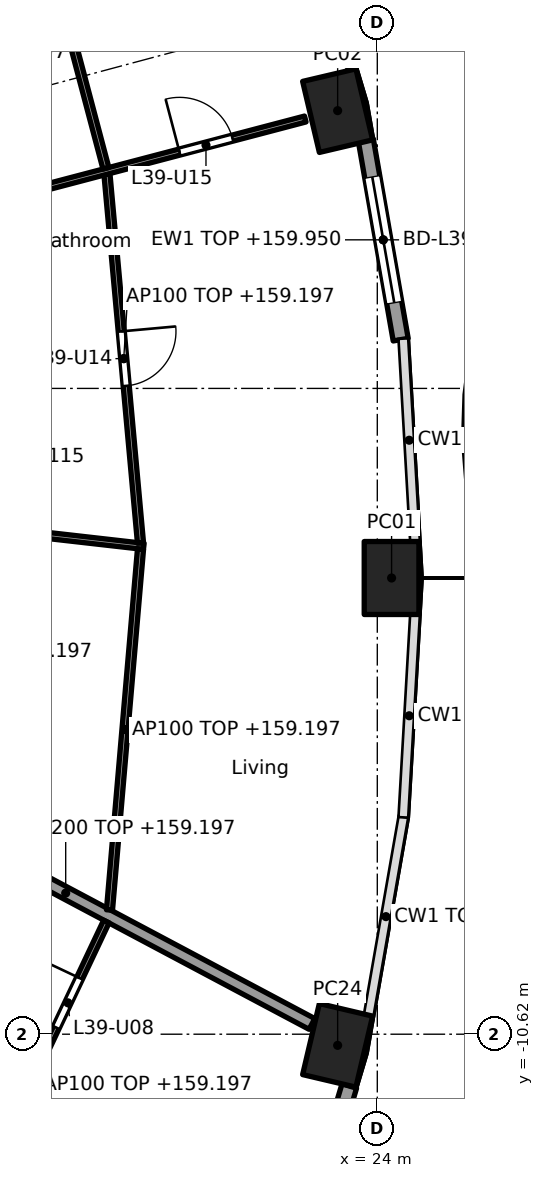
"""IFC4 building model, lengths in metres.
Left out: names, types, materials, properties, quantities, classifications, styles, units other than length and angle.
Written with IfcOpenShell. Run it as: python <this file> out.ifc"""

import sys

from ifc_helpers import new_model, si_unit, direction, frame, frame_2d, origin, origin_2d, place, context, subcontext, project, spatial, rectangle, hollow_rectangle, extrude, element, fill, save


model = new_model("IFC4")
c1 = context("Model", 3, precision=1e-05, world=origin(), true_north=direction((0.0, 1.0)))
c2 = subcontext(c1, "Body", "Model", "MODEL_VIEW")
j1 = project(units=[si_unit("LENGTHUNIT", "METRE"), si_unit("PLANEANGLEUNIT", "RADIAN")], contexts=[c1])
p1 = place(None, origin())
s1 = spatial("IfcSite", under=j1, at=p1, CompositionType="ELEMENT")
p2 = place(p1, origin())
s2 = spatial("IfcBuilding", under=s1, at=p2, CompositionType="ELEMENT")
p3 = place(p2, frame((0.0, 0.0, 156.6)))
s3 = spatial("IfcBuildingStorey", under=s2, at=p3, CompositionType="ELEMENT", Elevation=156.6)
for number, where, z_axis, x_axis in (
    (1, (24.235, -3.118, 0.0), (0.0, 0.0, 1.0), (0.0, 1.0, 0.0)),
    (2, (23.348, 4.568, 0.0), (0.0, 0.0, 1.0), (-0.229, 0.973, 0.0)),
    (3, (23.348, -10.803, 0.0), (0.0, 0.0, 1.0), (0.229, 0.973, 0.0)),
):
    element("IfcColumn", number, at=place(p3, frame(where, z_axis=z_axis, x_axis=x_axis)), inside=s3, PredefinedType="COLUMN", context=c2, shape_type="SweptSolid", body=[
        extrude(hollow_rectangle(XDim=1.2, YDim=0.9, WallThickness=0.04, at=origin_2d()), origin(), (0.0, 0.0, 1.0), 3.7),
    ])
p4 = place(p3, frame((23.811, 4.085, 0.0), z_axis=(0.0, 0.0, 1.0), x_axis=(0.172163521006, -0.985068384446, 0.0)))
e4 = element("IfcWall", 4, at=p4, inside=s3, PredefinedType="SOLIDWALL", context=c2, shape_type="SweptSolid", body=[
    extrude(rectangle(XDim=3.333, YDim=0.25, at=frame_2d((1.666, 0.0))), origin(), (0.0, 0.0, 1.0), 3.35),
])
p5 = place(p4, frame((0.616, 0.0, 0.0)))
e5 = element("IfcOpeningElement", 5, at=p5, cuts=e4, PredefinedType="OPENING", context=c2, shape_type="SweptSolid", body=[
    extrude(rectangle(XDim=2.1, YDim=2.4, at=frame_2d((1.05, 1.2))), frame((0.0, 0.135, 0.0), z_axis=(0.0, -1.0, 0.0), x_axis=(1.0, 0.0, 0.0)), (0.0, 0.0, 1.0), 0.27),
])
p6 = place(p3, frame((23.54, -11.472, 0.0), z_axis=(0.0, 0.0, 1.0), x_axis=(-0.285821792767, -0.958282788523, 0.0)))
e6 = element("IfcWall", 6, at=p6, inside=s3, PredefinedType="SOLIDWALL", context=c2, shape_type="SweptSolid", body=[
    extrude(rectangle(XDim=3.303, YDim=0.25, at=frame_2d((1.651, 0.0))), origin(), (0.0, 0.0, 1.0), 3.35),
])
p7 = place(p6, frame((0.602, 0.0, 0.0)))
e7 = element("IfcOpeningElement", 7, at=p7, cuts=e6, PredefinedType="OPENING", context=c2, shape_type="SweptSolid", body=[
    extrude(rectangle(XDim=2.1, YDim=2.4, at=frame_2d((1.05, 1.2))), frame((0.0, 0.135, 0.0), z_axis=(0.0, -1.0, 0.0), x_axis=(1.0, 0.0, 0.0)), (0.0, 0.0, 1.0), 0.27),
])
p8 = place(p3, frame((14.826, -6.146, 0.0), z_axis=(0.0, 0.0, 1.0), x_axis=(0.883012998471, -0.469348532044, 0.0)))
e8 = element("IfcWall", 8, at=p8, inside=s3, PredefinedType="PARTITIONING", context=c2, shape_type="SweptSolid", body=[
    extrude(rectangle(XDim=9.172, YDim=0.2, at=frame_2d((4.586, 0.0))), origin(), (0.0, 0.0, 1.0), 2.597),
])
p9 = place(p3, frame((12.664, -1.746, 0.0), z_axis=(0.0, 0.0, 1.0), x_axis=(0.993605172276, -0.112910414164, 0.0)))
e9 = element("IfcWall", 9, at=p9, inside=s3, PredefinedType="PARTITIONING", context=c2, shape_type="SweptSolid", body=[
    extrude(rectangle(XDim=7.544, YDim=0.1, at=frame_2d((3.772, 0.0))), origin(), (0.0, 0.0, 1.0), 2.515),
])
p10 = place(p9, frame((1.154, 0.0, 0.0)))
e10 = element("IfcOpeningElement", 10, at=p10, cuts=e9, PredefinedType="OPENING", context=c2, shape_type="SweptSolid", body=[
    extrude(rectangle(XDim=0.9, YDim=2.1, at=frame_2d((0.45, 1.05))), frame((0.0, 0.06, 0.0), z_axis=(0.0, -1.0, 0.0), x_axis=(1.0, 0.0, 0.0)), (0.0, 0.0, 1.0), 0.12),
])
p11 = place(p9, frame((4.901, 0.0, 0.0)))
e11 = element("IfcOpeningElement", 11, at=p11, cuts=e9, PredefinedType="OPENING", context=c2, shape_type="SweptSolid", body=[
    extrude(rectangle(XDim=0.9, YDim=2.1, at=frame_2d((0.45, 1.05))), frame((0.0, 0.06, 0.0), z_axis=(0.0, -1.0, 0.0), x_axis=(1.0, 0.0, 0.0)), (0.0, 0.0, 1.0), 0.12),
])
p12 = place(p3, frame((20.106, -2.542, 0.0), z_axis=(0.0, 0.0, 1.0), x_axis=(-0.090571896131, 0.995889919434, 0.0)))
e12 = element("IfcWall", 12, at=p12, inside=s3, PredefinedType="PARTITIONING", context=c2, shape_type="SweptSolid", body=[
    extrude(rectangle(XDim=6.089, YDim=0.1, at=frame_2d((3.045, 0.0))), origin(), (0.0, 0.0, 1.0), 2.597),
])
p13 = place(p12, frame((2.594, 0.0, 0.0)))
e13 = element("IfcOpeningElement", 13, at=p13, cuts=e12, PredefinedType="OPENING", context=c2, shape_type="SweptSolid", body=[
    extrude(rectangle(XDim=0.9, YDim=2.1, at=frame_2d((0.45, 1.05))), frame((0.0, 0.06, 0.0), z_axis=(0.0, -1.0, 0.0), x_axis=(1.0, 0.0, 0.0)), (0.0, 0.0, 1.0), 0.12),
])
p14 = place(p3, frame((20.106, -2.642, 0.0), z_axis=(0.0, 0.0, 1.0), x_axis=(-0.085694058383, -0.996321498492, 0.0)))
e14 = element("IfcWall", 14, at=p14, inside=s3, PredefinedType="PARTITIONING", context=c2, shape_type="SweptSolid", body=[
    extrude(rectangle(XDim=5.957, YDim=0.1, at=frame_2d((2.979, 0.0))), origin(), (0.0, 0.0, 1.0), 2.597),
])
p15 = place(p3, frame((12.661, 1.76, 0.0), z_axis=(0.0, 0.0, 1.0), x_axis=(0.967120304949, 0.254319318488, 0.0)))
e15 = element("IfcWall", 15, at=p15, inside=s3, PredefinedType="PARTITIONING", context=c2, shape_type="SweptSolid", body=[
    extrude(rectangle(XDim=10.499, YDim=0.1, at=frame_2d((5.25, 0.0))), origin(), (0.0, 0.0, 1.0), 2.515),
])
p16 = place(p15, frame((1.073, 0.0, 0.0)))
e16 = element("IfcOpeningElement", 16, at=p16, cuts=e15, PredefinedType="OPENING", context=c2, shape_type="SweptSolid", body=[
    extrude(rectangle(XDim=0.9, YDim=2.1, at=frame_2d((0.45, 1.05))), frame((0.0, 0.06, 0.0), z_axis=(0.0, -1.0, 0.0), x_axis=(1.0, 0.0, 0.0)), (0.0, 0.0, 1.0), 0.12),
])
p17 = place(p15, frame((4.634, 0.0, 0.0)))
e17 = element("IfcOpeningElement", 17, at=p17, cuts=e15, PredefinedType="OPENING", context=c2, shape_type="SweptSolid", body=[
    extrude(rectangle(XDim=0.9, YDim=2.1, at=frame_2d((0.45, 1.05))), frame((0.0, 0.06, 0.0), z_axis=(0.0, -1.0, 0.0), x_axis=(1.0, 0.0, 0.0)), (0.0, 0.0, 1.0), 0.12),
])
p18 = place(p15, frame((8.361, 0.0, 0.0)))
e18 = element("IfcOpeningElement", 18, at=p18, cuts=e15, PredefinedType="OPENING", context=c2, shape_type="SweptSolid", body=[
    extrude(rectangle(XDim=0.9, YDim=2.1, at=frame_2d((0.45, 1.05))), frame((0.0, 0.06, 0.0), z_axis=(0.0, -1.0, 0.0), x_axis=(1.0, 0.0, 0.0)), (0.0, 0.0, 1.0), 0.12),
])
p19 = place(p3, frame((19.537, 3.62, 0.0), z_axis=(0.0, 0.0, 1.0), x_axis=(-0.255909310473, 0.966700793841, 0.0)))
e19 = element("IfcWall", 19, at=p19, inside=s3, PredefinedType="PARTITIONING", context=c2, shape_type="SweptSolid", body=[
    extrude(rectangle(XDim=5.609, YDim=0.1, at=frame_2d((2.804, 0.0))), origin(), (0.0, 0.0, 1.0), 2.597),
])
p20 = place(p19, frame((3.769, 0.0, 0.0)))
e20 = element("IfcOpeningElement", 20, at=p20, cuts=e19, PredefinedType="OPENING", context=c2, shape_type="SweptSolid", body=[
    extrude(rectangle(XDim=0.9, YDim=2.1, at=frame_2d((0.45, 1.05))), frame((0.0, 0.06, 0.0), z_axis=(0.0, -1.0, 0.0), x_axis=(1.0, 0.0, 0.0)), (0.0, 0.0, 1.0), 0.12),
])
p21 = place(p3, frame((15.456, 4.552, 0.0), z_axis=(0.0, 0.0, 1.0), x_axis=(0.8809418045, 0.473224615889, 0.0)))
e21 = element("IfcWall", 21, at=p21, inside=s3, PredefinedType="PARTITIONING", context=c2, shape_type="SweptSolid", body=[
    extrude(rectangle(XDim=3.76, YDim=0.1, at=frame_2d((1.88, 0.0))), origin(), (0.0, 0.0, 1.0), 3.35),
])
p22 = place(p3, frame((10.184, -7.727, 0.0), z_axis=(0.0, 0.0, 1.0), x_axis=(0.723635100101, -0.690182759783, 0.0)))
e22 = element("IfcWall", 22, at=p22, inside=s3, PredefinedType="PARTITIONING", context=c2, shape_type="SweptSolid", body=[
    extrude(rectangle(XDim=14.173, YDim=0.1, at=frame_2d((7.086, 0.0))), origin(), (0.0, 0.0, 1.0), 2.515),
])
p23 = place(p22, frame((1.565, 0.0, 0.0)))
e23 = element("IfcOpeningElement", 23, at=p23, cuts=e22, PredefinedType="OPENING", context=c2, shape_type="SweptSolid", body=[
    extrude(rectangle(XDim=0.9, YDim=2.1, at=frame_2d((0.45, 1.05))), frame((0.0, 0.06, 0.0), z_axis=(0.0, -1.0, 0.0), x_axis=(1.0, 0.0, 0.0)), (0.0, 0.0, 1.0), 0.12),
])
p24 = place(p22, frame((6.257, 0.0, 0.0)))
e24 = element("IfcOpeningElement", 24, at=p24, cuts=e22, PredefinedType="OPENING", context=c2, shape_type="SweptSolid", body=[
    extrude(rectangle(XDim=0.9, YDim=2.1, at=frame_2d((0.45, 1.05))), frame((0.0, 0.06, 0.0), z_axis=(0.0, -1.0, 0.0), x_axis=(1.0, 0.0, 0.0)), (0.0, 0.0, 1.0), 0.12),
])
p25 = place(p22, frame((11.328, 0.0, 0.0)))
e25 = element("IfcOpeningElement", 25, at=p25, cuts=e22, PredefinedType="OPENING", context=c2, shape_type="SweptSolid", body=[
    extrude(rectangle(XDim=0.9, YDim=2.1, at=frame_2d((0.45, 1.05))), frame((0.0, 0.06, 0.0), z_axis=(0.0, -1.0, 0.0), x_axis=(1.0, 0.0, 0.0)), (0.0, 0.0, 1.0), 0.12),
])
p26 = place(p3, frame((16.995, -14.158, 0.0), z_axis=(0.0, 0.0, 1.0), x_axis=(0.427436809038, 0.904045228005, 0.0)))
e26 = element("IfcWall", 26, at=p26, inside=s3, PredefinedType="PARTITIONING", context=c2, shape_type="SweptSolid", body=[
    extrude(rectangle(XDim=5.963, YDim=0.1, at=frame_2d((2.981, 0.0))), origin(), (0.0, 0.0, 1.0), 2.597),
])
p27 = place(p26, frame((4.035, 0.0, 0.0)))
e27 = element("IfcOpeningElement", 27, at=p27, cuts=e26, PredefinedType="OPENING", context=c2, shape_type="SweptSolid", body=[
    extrude(rectangle(XDim=0.9, YDim=2.1, at=frame_2d((0.45, 1.05))), frame((0.0, 0.06, 0.0), z_axis=(0.0, -1.0, 0.0), x_axis=(1.0, 0.0, 0.0)), (0.0, 0.0, 1.0), 0.12),
])
p28 = place(p5, origin())
e28 = element("IfcDoor", 28, at=p28, inside=s3, OperationType="SLIDING_TO_LEFT", PredefinedType="DOOR", context=c2, shape_type="SweptSolid", body=[
    extrude(rectangle(XDim=2.1, YDim=2.4, at=frame_2d((1.05, 1.2))), frame((0.0, 0.025, 0.0), z_axis=(0.0, -1.0, 0.0), x_axis=(1.0, 0.0, 0.0)), (0.0, 0.0, 1.0), 0.05),
])
fill(e5, e28)
p29 = place(p27, origin())
e29 = element("IfcDoor", 29, at=p29, inside=s3, OperationType="SINGLE_SWING_RIGHT", PredefinedType="DOOR", context=c2, shape_type="SweptSolid", body=[
    extrude(rectangle(XDim=0.9, YDim=2.1, at=frame_2d((0.45, 1.05))), frame((0.0, 0.025, 0.0), z_axis=(0.0, -1.0, 0.0), x_axis=(1.0, 0.0, 0.0)), (0.0, 0.0, 1.0), 0.05),
])
fill(e27, e29)
p30 = place(p13, frame((0.9, 0.0, 0.0), x_axis=(-1.0, 0.0, 0.0)))
e30 = element("IfcDoor", 30, at=p30, inside=s3, OperationType="SINGLE_SWING_LEFT", PredefinedType="DOOR", context=c2, shape_type="SweptSolid", body=[
    extrude(rectangle(XDim=0.9, YDim=2.1, at=frame_2d((0.45, 1.05))), frame((0.0, 0.025, 0.0), z_axis=(0.0, -1.0, 0.0), x_axis=(1.0, 0.0, 0.0)), (0.0, 0.0, 1.0), 0.05),
])
fill(e13, e30)
p31 = place(p18, origin())
e31 = element("IfcDoor", 31, at=p31, inside=s3, OperationType="SINGLE_SWING_LEFT", PredefinedType="DOOR", context=c2, shape_type="SweptSolid", body=[
    extrude(rectangle(XDim=0.9, YDim=2.1, at=frame_2d((0.45, 1.05))), frame((0.0, 0.025, 0.0), z_axis=(0.0, -1.0, 0.0), x_axis=(1.0, 0.0, 0.0)), (0.0, 0.0, 1.0), 0.05),
])
fill(e18, e31)
save(model, sys.argv[1])
